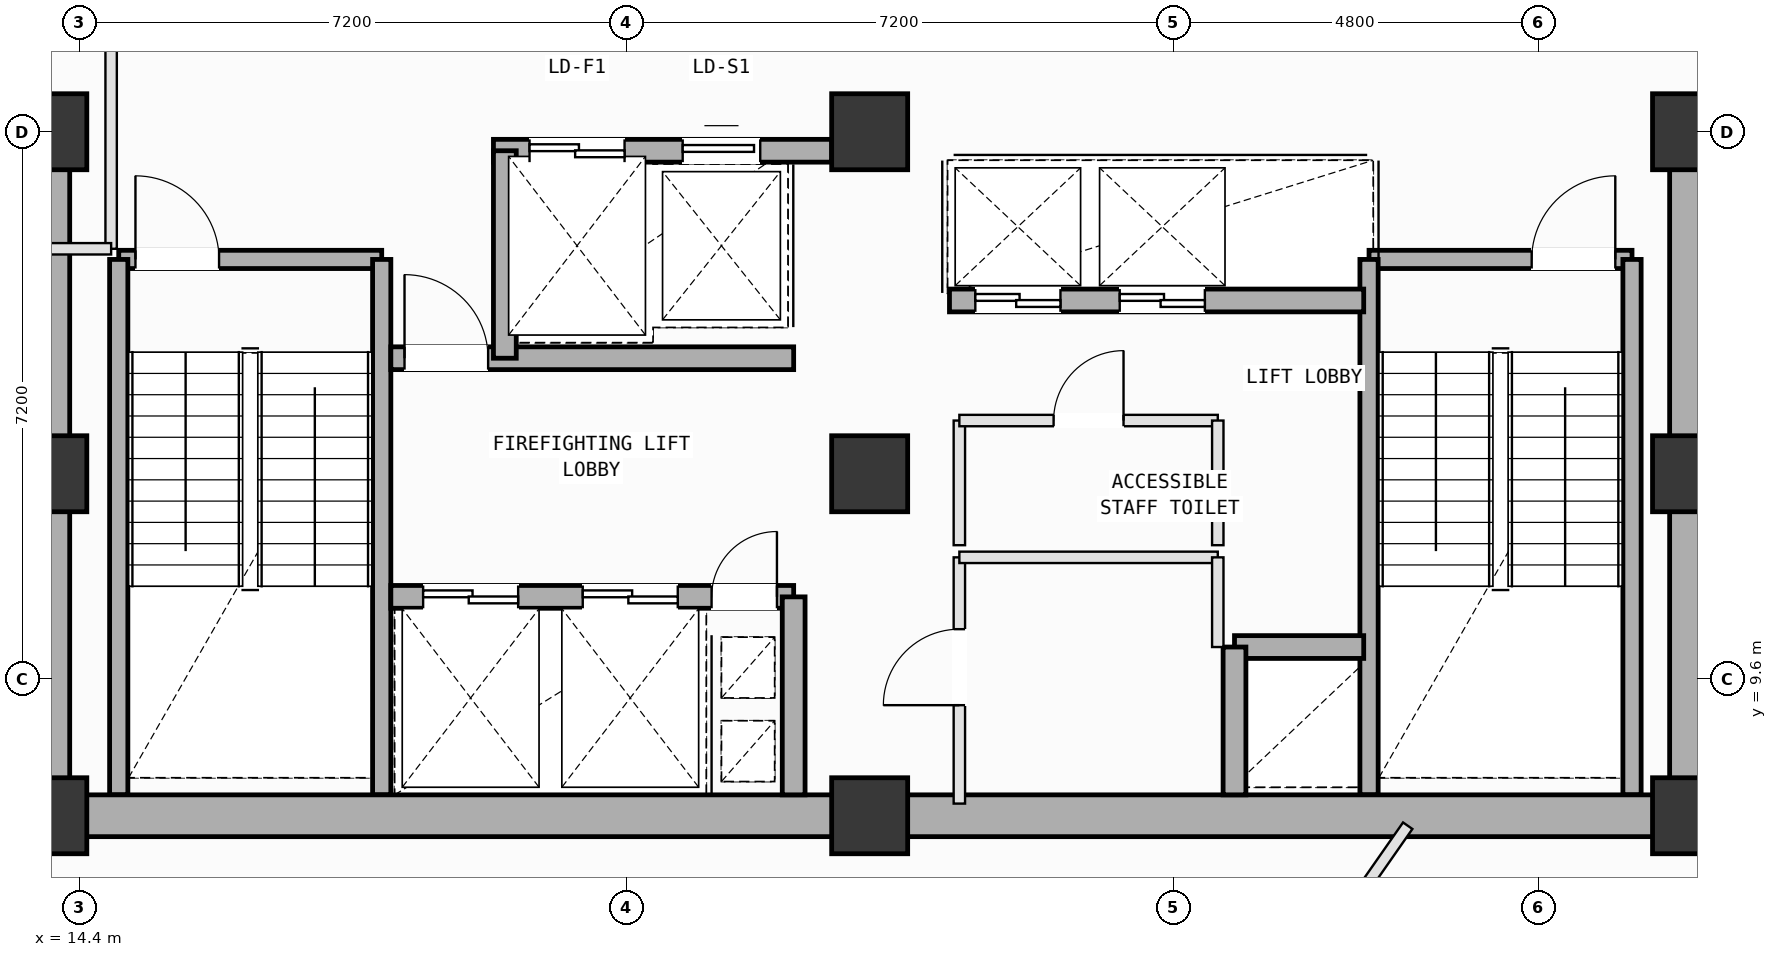
"""IFC4 building model, lengths in metres.
Left out: names, types, materials, properties, quantities, classifications, styles, units other than length and angle.
Written with IfcOpenShell. Run it as: python <this file> out.ifc"""

import sys

from ifc_helpers import new_model, si_unit, direction, frame, frame_2d, origin, origin_2d, place, context, subcontext, project, spatial, rectangle, extrude, element, fill, save


model = new_model("IFC4")
c1 = context("Model", 3, precision=1e-05, world=origin(), true_north=direction((0.0, 1.0)))
c2 = subcontext(c1, "Body", "Model", "MODEL_VIEW")
j1 = project(units=[si_unit("LENGTHUNIT", "METRE"), si_unit("PLANEANGLEUNIT", "RADIAN")], contexts=[c1])
p1 = place(None, origin())
s1 = spatial("IfcSite", under=j1, at=p1, CompositionType="ELEMENT")
p2 = place(p1, origin())
s2 = spatial("IfcBuilding", under=s1, at=p2, CompositionType="ELEMENT")
p3 = place(p2, frame((0.0, 0.0, 259.2)))
s3 = spatial("IfcBuildingStorey", under=s2, at=p3, CompositionType="ELEMENT", Elevation=259.2)
for number, where, z_axis, x_axis in (
    (1, (14.0, 7.8, 0.0), (0.0, 0.0, 1.0), (1.0, 0.0, 0.0)),
    (2, (14.0, 12.3, 0.0), (0.0, 0.0, 1.0), (1.0, 0.0, 0.0)),
    (3, (14.0, 16.8, 0.0), (0.0, 0.0, 1.0), (1.0, 0.0, 0.0)),
    (4, (24.8, 7.8, 0.0), (0.0, 0.0, 1.0), (1.0, 0.0, 0.0)),
    (5, (24.8, 12.3, 0.0), (0.0, 0.0, 1.0), (1.0, 0.0, 0.0)),
    (6, (24.8, 16.8, 0.0), (0.0, 0.0, 1.0), (1.0, 0.0, 0.0)),
    (7, (35.6, 7.8, 0.0), (0.0, 0.0, 1.0), (1.0, 0.0, 0.0)),
    (8, (35.6, 12.3, 0.0), (0.0, 0.0, 1.0), (1.0, 0.0, 0.0)),
    (9, (35.6, 16.8, 0.0), (0.0, 0.0, 1.0), (1.0, 0.0, 0.0)),
):
    element("IfcColumn", number, at=place(p3, frame(where, z_axis=z_axis, x_axis=x_axis)), inside=s3, PredefinedType="COLUMN", context=c2, shape_type="SweptSolid", body=[
        extrude(rectangle(XDim=1.0, YDim=1.0, at=origin_2d()), origin(), (0.0, 0.0, 1.0), 4.0),
    ])
p4 = place(p3, frame((14.92, 15.12, 0.0), z_axis=(0.0, 0.0, 1.0), x_axis=(1.0, 0.0, 0.0)))
e10 = element("IfcWall", 10, at=p4, inside=s3, PredefinedType="SOLIDWALL", context=c2, shape_type="SweptSolid", body=[
    extrude(rectangle(XDim=3.46, YDim=0.24, at=frame_2d((1.73, 0.0))), origin(), (0.0, 0.0, 1.0), 3.78),
])
p5 = place(p4, frame((0.22, 0.0, 0.0)))
e11 = element("IfcOpeningElement", 11, at=p5, cuts=e10, PredefinedType="OPENING", context=c2, shape_type="SweptSolid", body=[
    extrude(rectangle(XDim=1.1, YDim=2.15, at=frame_2d((0.55, 1.075))), frame((0.0, 0.13, 0.0), z_axis=(0.0, -1.0, 0.0), x_axis=(1.0, 0.0, 0.0)), (0.0, 0.0, 1.0), 0.26),
])
for number, where, z_axis, x_axis in (
    (12, (18.38, 15.12, 0.0), (0.0, 0.0, 1.0), (0.0, -1.0, 0.0)),
    (13, (14.92, 8.075, 0.0), (0.0, 0.0, 1.0), (0.0, 1.0, 0.0)),
):
    element("IfcWall", number, at=place(p3, frame(where, z_axis=z_axis, x_axis=x_axis)), inside=s3, PredefinedType="SOLIDWALL", context=c2, shape_type="SweptSolid", body=[
        extrude(rectangle(XDim=7.045, YDim=0.24, at=frame_2d((3.522, 0.0))), origin(), (0.0, 0.0, 1.0), 3.78),
    ])
p6 = place(p3, frame((31.37, 15.12, 0.0), z_axis=(0.0, 0.0, 1.0), x_axis=(1.0, 0.0, 0.0)))
e14 = element("IfcWall", 14, at=p6, inside=s3, PredefinedType="SOLIDWALL", context=c2, shape_type="SweptSolid", body=[
    extrude(rectangle(XDim=3.46, YDim=0.24, at=frame_2d((1.73, 0.0))), origin(), (0.0, 0.0, 1.0), 3.78),
])
p7 = place(p6, frame((2.14, 0.0, 0.0)))
e15 = element("IfcOpeningElement", 15, at=p7, cuts=e14, PredefinedType="OPENING", context=c2, shape_type="SweptSolid", body=[
    extrude(rectangle(XDim=1.1, YDim=2.15, at=frame_2d((0.55, 1.075))), frame((0.0, 0.13, 0.0), z_axis=(0.0, -1.0, 0.0), x_axis=(1.0, 0.0, 0.0)), (0.0, 0.0, 1.0), 0.26),
])
for number, where, z_axis, x_axis in (
    (16, (34.83, 15.12, 0.0), (0.0, 0.0, 1.0), (0.0, -1.0, 0.0)),
    (17, (31.37, 8.075, 0.0), (0.0, 0.0, 1.0), (0.0, 1.0, 0.0)),
):
    element("IfcWall", number, at=place(p3, frame(where, z_axis=z_axis, x_axis=x_axis)), inside=s3, PredefinedType="SOLIDWALL", context=c2, shape_type="SweptSolid", body=[
        extrude(rectangle(XDim=7.045, YDim=0.24, at=frame_2d((3.522, 0.0))), origin(), (0.0, 0.0, 1.0), 3.78),
    ])
for number, where, z_axis, x_axis in (
    (18, (14.0, 7.8, 0.0), (0.0, 0.0, 1.0), (1.0, 0.0, 0.0)),
    (19, (24.8, 7.8, 0.0), (0.0, 0.0, 1.0), (1.0, 0.0, 0.0)),
):
    element("IfcWall", number, at=place(p3, frame(where, z_axis=z_axis, x_axis=x_axis)), inside=s3, PredefinedType="SHEAR", context=c2, shape_type="SweptSolid", body=[
        extrude(rectangle(XDim=10.8, YDim=0.55, at=frame_2d((5.4, 0.0))), origin(), (0.0, 0.0, 1.0), 3.78),
    ])
for number, where, z_axis, x_axis in (
    (20, (35.6, 7.8, 0.0), (0.0, 0.0, 1.0), (0.0, 1.0, 0.0)),
    (21, (14.0, 16.8, 0.0), (0.0, 0.0, 1.0), (0.0, -1.0, 0.0)),
):
    element("IfcWall", number, at=place(p3, frame(where, z_axis=z_axis, x_axis=x_axis)), inside=s3, PredefinedType="SHEAR", context=c2, shape_type="SweptSolid", body=[
        extrude(rectangle(XDim=9.0, YDim=0.55, at=frame_2d((4.5, 0.0))), origin(), (0.0, 0.0, 1.0), 3.78),
    ])
p8 = place(p3, frame((19.85, 16.55, 0.0), z_axis=(0.0, 0.0, 1.0), x_axis=(1.0, 0.0, 0.0)))
e22 = element("IfcWall", 22, at=p8, inside=s3, PredefinedType="SOLIDWALL", context=c2, shape_type="SweptSolid", body=[
    extrude(rectangle(XDim=4.45, YDim=0.3, at=frame_2d((2.225, 0.0))), origin(), (0.0, 0.0, 1.0), 3.78),
])
p9 = place(p8, frame((0.475, 0.0, 0.0)))
e23 = element("IfcOpeningElement", 23, at=p9, cuts=e22, PredefinedType="OPENING", context=c2, shape_type="SweptSolid", body=[
    extrude(rectangle(XDim=1.25, YDim=2.18, at=frame_2d((0.625, 1.09))), frame((0.0, 0.16, 0.0), z_axis=(0.0, -1.0, 0.0), x_axis=(1.0, 0.0, 0.0)), (0.0, 0.0, 1.0), 0.32),
])
p10 = place(p8, frame((2.49, 0.0, 0.0)))
e24 = element("IfcOpeningElement", 24, at=p10, cuts=e22, PredefinedType="OPENING", context=c2, shape_type="SweptSolid", body=[
    extrude(rectangle(XDim=1.02, YDim=2.12, at=frame_2d((0.51, 1.06))), frame((0.0, 0.16, 0.0), z_axis=(0.0, -1.0, 0.0), x_axis=(1.0, 0.0, 0.0)), (0.0, 0.0, 1.0), 0.32),
])
p11 = place(p3, frame((18.5, 10.68, 0.0), z_axis=(0.0, 0.0, 1.0), x_axis=(1.0, 0.0, 0.0)))
e25 = element("IfcWall", 25, at=p11, inside=s3, PredefinedType="SOLIDWALL", context=c2, shape_type="SweptSolid", body=[
    extrude(rectangle(XDim=5.3, YDim=0.3, at=frame_2d((2.65, 0.0))), origin(), (0.0, 0.0, 1.0), 3.78),
])
p12 = place(p11, frame((4.22, 0.0, 0.0)))
e26 = element("IfcOpeningElement", 26, at=p12, cuts=e25, PredefinedType="OPENING", context=c2, shape_type="SweptSolid", body=[
    extrude(rectangle(XDim=0.86, YDim=2.06, at=frame_2d((0.43, 1.03))), frame((0.0, 0.16, 0.0), z_axis=(0.0, -1.0, 0.0), x_axis=(1.0, 0.0, 0.0)), (0.0, 0.0, 1.0), 0.32),
])
p13 = place(p11, frame((0.425, 0.0, 0.0)))
e27 = element("IfcOpeningElement", 27, at=p13, cuts=e25, PredefinedType="OPENING", context=c2, shape_type="SweptSolid", body=[
    extrude(rectangle(XDim=1.25, YDim=2.18, at=frame_2d((0.625, 1.09))), frame((0.0, 0.16, 0.0), z_axis=(0.0, -1.0, 0.0), x_axis=(1.0, 0.0, 0.0)), (0.0, 0.0, 1.0), 0.32),
])
p14 = place(p11, frame((2.525, 0.0, 0.0)))
e28 = element("IfcOpeningElement", 28, at=p14, cuts=e25, PredefinedType="OPENING", context=c2, shape_type="SweptSolid", body=[
    extrude(rectangle(XDim=1.25, YDim=2.18, at=frame_2d((0.625, 1.09))), frame((0.0, 0.16, 0.0), z_axis=(0.0, -1.0, 0.0), x_axis=(1.0, 0.0, 0.0)), (0.0, 0.0, 1.0), 0.32),
])
p15 = place(p3, frame((18.5, 13.82, 0.0), z_axis=(0.0, 0.0, 1.0), x_axis=(1.0, 0.0, 0.0)))
e29 = element("IfcWall", 29, at=p15, inside=s3, PredefinedType="SOLIDWALL", context=c2, shape_type="SweptSolid", body=[
    extrude(rectangle(XDim=5.3, YDim=0.3, at=frame_2d((2.65, 0.0))), origin(), (0.0, 0.0, 1.0), 3.78),
])
p16 = place(p15, frame((0.18, 0.0, 0.0)))
e30 = element("IfcOpeningElement", 30, at=p16, cuts=e29, PredefinedType="OPENING", context=c2, shape_type="SweptSolid", body=[
    extrude(rectangle(XDim=1.1, YDim=2.15, at=frame_2d((0.55, 1.075))), frame((0.0, 0.16, 0.0), z_axis=(0.0, -1.0, 0.0), x_axis=(1.0, 0.0, 0.0)), (0.0, 0.0, 1.0), 0.32),
])
p17 = place(p3, frame((23.8, 8.075, 0.0), z_axis=(0.0, 0.0, 1.0), x_axis=(0.0, 1.0, 0.0)))
e31 = element("IfcWall", 31, at=p17, inside=s3, PredefinedType="SOLIDWALL", context=c2, shape_type="SweptSolid", body=[
    extrude(rectangle(XDim=2.605, YDim=0.3, at=frame_2d((1.302, 0.0))), origin(), (0.0, 0.0, 1.0), 3.78),
])
p18 = place(p3, frame((20.0, 13.82, 0.0), z_axis=(0.0, 0.0, 1.0), x_axis=(0.0, 1.0, 0.0)))
e32 = element("IfcWall", 32, at=p18, inside=s3, PredefinedType="SOLIDWALL", context=c2, shape_type="SweptSolid", body=[
    extrude(rectangle(XDim=2.73, YDim=0.3, at=frame_2d((1.365, 0.0))), origin(), (0.0, 0.0, 1.0), 3.78),
])
p19 = place(p3, frame((29.6, 10.02, 0.0), z_axis=(0.0, 0.0, 1.0), x_axis=(1.0, 0.0, 0.0)))
e33 = element("IfcWall", 33, at=p19, inside=s3, PredefinedType="SOLIDWALL", context=c2, shape_type="SweptSolid", body=[
    extrude(rectangle(XDim=1.7, YDim=0.3, at=frame_2d((0.85, 0.0))), origin(), (0.0, 0.0, 1.0), 3.78),
])
p20 = place(p3, frame((29.6, 8.075, 0.0), z_axis=(0.0, 0.0, 1.0), x_axis=(0.0, 1.0, 0.0)))
e34 = element("IfcWall", 34, at=p20, inside=s3, PredefinedType="SOLIDWALL", context=c2, shape_type="SweptSolid", body=[
    extrude(rectangle(XDim=1.945, YDim=0.3, at=frame_2d((0.973, 0.0))), origin(), (0.0, 0.0, 1.0), 3.78),
])
p21 = place(p3, frame((25.85, 14.58, 0.0), z_axis=(0.0, 0.0, 1.0), x_axis=(1.0, 0.0, 0.0)))
e35 = element("IfcWall", 35, at=p21, inside=s3, PredefinedType="SOLIDWALL", context=c2, shape_type="SweptSolid", body=[
    extrude(rectangle(XDim=5.45, YDim=0.3, at=frame_2d((2.725, 0.0))), origin(), (0.0, 0.0, 1.0), 3.78),
])
p22 = place(p21, frame((0.34, 0.0, 0.0)))
e36 = element("IfcOpeningElement", 36, at=p22, cuts=e35, PredefinedType="OPENING", context=c2, shape_type="SweptSolid", body=[
    extrude(rectangle(XDim=1.12, YDim=2.15, at=frame_2d((0.56, 1.075))), frame((0.0, 0.16, 0.0), z_axis=(0.0, -1.0, 0.0), x_axis=(1.0, 0.0, 0.0)), (0.0, 0.0, 1.0), 0.32),
])
p23 = place(p21, frame((2.24, 0.0, 0.0)))
e37 = element("IfcOpeningElement", 37, at=p23, cuts=e35, PredefinedType="OPENING", context=c2, shape_type="SweptSolid", body=[
    extrude(rectangle(XDim=1.12, YDim=2.15, at=frame_2d((0.56, 1.075))), frame((0.0, 0.16, 0.0), z_axis=(0.0, -1.0, 0.0), x_axis=(1.0, 0.0, 0.0)), (0.0, 0.0, 1.0), 0.32),
])
p24 = place(p3, frame((25.98, 7.96, 0.0), z_axis=(0.0, 0.0, 1.0), x_axis=(0.0, 1.0, 0.0)))
e38 = element("IfcWall", 38, at=p24, inside=s3, PredefinedType="PARTITIONING", context=c2, shape_type="SweptSolid", body=[
    extrude(rectangle(XDim=3.24, YDim=0.15, at=frame_2d((1.62, 0.0))), origin(), (0.0, 0.0, 1.0), 3.78),
])
p25 = place(p24, frame((1.295, 0.0, 0.0)))
e39 = element("IfcOpeningElement", 39, at=p25, cuts=e38, PredefinedType="OPENING", context=c2, shape_type="SweptSolid", body=[
    extrude(rectangle(XDim=1.0, YDim=2.12, at=frame_2d((0.5, 1.06))), frame((0.0, 0.085, 0.0), z_axis=(0.0, -1.0, 0.0), x_axis=(1.0, 0.0, 0.0)), (0.0, 0.0, 1.0), 0.17),
])
p26 = place(p3, frame((25.98, 11.2, 0.0), z_axis=(0.0, 0.0, 1.0), x_axis=(1.0, 0.0, 0.0)))
e40 = element("IfcWall", 40, at=p26, inside=s3, PredefinedType="PARTITIONING", context=c2, shape_type="SweptSolid", body=[
    extrude(rectangle(XDim=3.4, YDim=0.15, at=frame_2d((1.7, 0.0))), origin(), (0.0, 0.0, 1.0), 3.78),
])
p27 = place(p3, frame((29.38, 11.2, 0.0), z_axis=(0.0, 0.0, 1.0), x_axis=(0.0, -1.0, 0.0)))
e41 = element("IfcWall", 41, at=p27, inside=s3, PredefinedType="PARTITIONING", context=c2, shape_type="SweptSolid", body=[
    extrude(rectangle(XDim=1.18, YDim=0.15, at=frame_2d((0.59, 0.0))), origin(), (0.0, 0.0, 1.0), 3.78),
])
p28 = place(p3, frame((25.98, 11.36, 0.0), z_axis=(0.0, 0.0, 1.0), x_axis=(0.0, 1.0, 0.0)))
e42 = element("IfcWall", 42, at=p28, inside=s3, PredefinedType="PARTITIONING", context=c2, shape_type="SweptSolid", body=[
    extrude(rectangle(XDim=1.64, YDim=0.15, at=frame_2d((0.82, 0.0))), origin(), (0.0, 0.0, 1.0), 3.78),
])
p29 = place(p3, frame((25.98, 13.0, 0.0), z_axis=(0.0, 0.0, 1.0), x_axis=(1.0, 0.0, 0.0)))
e43 = element("IfcWall", 43, at=p29, inside=s3, PredefinedType="PARTITIONING", context=c2, shape_type="SweptSolid", body=[
    extrude(rectangle(XDim=3.4, YDim=0.15, at=frame_2d((1.7, 0.0))), origin(), (0.0, 0.0, 1.0), 3.78),
])
p30 = place(p29, frame((1.24, 0.0, 0.0)))
e44 = element("IfcOpeningElement", 44, at=p30, cuts=e43, PredefinedType="OPENING", context=c2, shape_type="SweptSolid", body=[
    extrude(rectangle(XDim=0.92, YDim=2.1, at=frame_2d((0.46, 1.05))), frame((0.0, 0.085, 0.0), z_axis=(0.0, -1.0, 0.0), x_axis=(1.0, 0.0, 0.0)), (0.0, 0.0, 1.0), 0.17),
])
p31 = place(p3, frame((29.38, 13.0, 0.0), z_axis=(0.0, 0.0, 1.0), x_axis=(0.0, -1.0, 0.0)))
e45 = element("IfcWall", 45, at=p31, inside=s3, PredefinedType="PARTITIONING", context=c2, shape_type="SweptSolid", body=[
    extrude(rectangle(XDim=1.64, YDim=0.15, at=frame_2d((0.82, 0.0))), origin(), (0.0, 0.0, 1.0), 3.78),
])
p32 = place(p3, frame((35.6, 7.5, 0.0), z_axis=(0.0, 0.0, 1.0), x_axis=(1.0, 0.0, 0.0)))
e46 = element("IfcWall", 46, at=p32, inside=s3, PredefinedType="PARTITIONING", context=c2, shape_type="SweptSolid", body=[
    extrude(rectangle(XDim=0.55, YDim=0.15, at=frame_2d((0.275, 0.0))), origin(), (0.0, 0.0, 1.0), 3.165),
])
p33 = place(p3, frame((31.879, 7.669, 0.0), z_axis=(0.0, 0.0, 1.0), x_axis=(-0.572169487651, -0.820135401871, 0.0)))
e47 = element("IfcWall", 47, at=p33, inside=s3, PredefinedType="PARTITIONING", context=c2, shape_type="SweptSolid", body=[
    extrude(rectangle(XDim=12.3, YDim=0.15, at=frame_2d((6.15, 0.0))), origin(), (0.0, 0.0, 1.0), 3.78),
])
p34 = place(p3, frame((14.82, 18.2, 0.0), z_axis=(0.0, 0.0, 1.0), x_axis=(0.0, -1.0, 0.0)))
e48 = element("IfcWall", 48, at=p34, inside=s3, PredefinedType="PARTITIONING", context=c2, shape_type="SweptSolid", body=[
    extrude(rectangle(XDim=2.94, YDim=0.15, at=frame_2d((1.47, 0.0))), origin(), (0.0, 0.0, 1.0), 3.78),
])
p35 = place(p3, frame((14.82, 15.26, 0.0), z_axis=(0.0, 0.0, 1.0), x_axis=(-1.0, 0.0, 0.0)))
e49 = element("IfcWall", 49, at=p35, inside=s3, PredefinedType="PARTITIONING", context=c2, shape_type="SweptSolid", body=[
    extrude(rectangle(XDim=1.12, YDim=0.15, at=frame_2d((0.56, 0.0))), origin(), (0.0, 0.0, 1.0), 3.78),
])
p36 = place(p5, origin())
e50 = element("IfcDoor", 50, at=p36, inside=s3, OperationType="SINGLE_SWING_LEFT", PredefinedType="DOOR", context=c2, shape_type="SweptSolid", body=[
    extrude(rectangle(XDim=1.1, YDim=2.15, at=frame_2d((0.55, 1.075))), frame((0.0, 0.025, 0.0), z_axis=(0.0, -1.0, 0.0), x_axis=(1.0, 0.0, 0.0)), (0.0, 0.0, 1.0), 0.05),
])
fill(e11, e50)
p37 = place(p7, origin())
e51 = element("IfcDoor", 51, at=p37, inside=s3, OperationType="SINGLE_SWING_RIGHT", PredefinedType="DOOR", context=c2, shape_type="SweptSolid", body=[
    extrude(rectangle(XDim=1.1, YDim=2.15, at=frame_2d((0.55, 1.075))), frame((0.0, 0.025, 0.0), z_axis=(0.0, -1.0, 0.0), x_axis=(1.0, 0.0, 0.0)), (0.0, 0.0, 1.0), 0.05),
])
fill(e15, e51)
p38 = place(p12, origin())
e52 = element("IfcDoor", 52, at=p38, inside=s3, OperationType="SINGLE_SWING_RIGHT", PredefinedType="DOOR", context=c2, shape_type="SweptSolid", body=[
    extrude(rectangle(XDim=0.86, YDim=2.06, at=frame_2d((0.43, 1.03))), frame((0.0, 0.025, 0.0), z_axis=(0.0, -1.0, 0.0), x_axis=(1.0, 0.0, 0.0)), (0.0, 0.0, 1.0), 0.05),
])
fill(e26, e52)
p39 = place(p16, origin())
e53 = element("IfcDoor", 53, at=p39, inside=s3, OperationType="SINGLE_SWING_LEFT", PredefinedType="DOOR", context=c2, shape_type="SweptSolid", body=[
    extrude(rectangle(XDim=1.1, YDim=2.15, at=frame_2d((0.55, 1.075))), frame((0.0, 0.025, 0.0), z_axis=(0.0, -1.0, 0.0), x_axis=(1.0, 0.0, 0.0)), (0.0, 0.0, 1.0), 0.05),
])
fill(e30, e53)
p40 = place(p13, origin())
e54 = element("IfcDoor", 54, at=p40, inside=s3, OperationType="DOUBLE_DOOR_SLIDING", PredefinedType="DOOR", context=c2, shape_type="SweptSolid", body=[
    extrude(rectangle(XDim=1.25, YDim=2.18, at=frame_2d((0.625, 1.09))), frame((0.0, 0.025, 0.0), z_axis=(0.0, -1.0, 0.0), x_axis=(1.0, 0.0, 0.0)), (0.0, 0.0, 1.0), 0.05),
])
fill(e27, e54)
p41 = place(p14, origin())
e55 = element("IfcDoor", 55, at=p41, inside=s3, OperationType="DOUBLE_DOOR_SLIDING", PredefinedType="DOOR", context=c2, shape_type="SweptSolid", body=[
    extrude(rectangle(XDim=1.25, YDim=2.18, at=frame_2d((0.625, 1.09))), frame((0.0, 0.025, 0.0), z_axis=(0.0, -1.0, 0.0), x_axis=(1.0, 0.0, 0.0)), (0.0, 0.0, 1.0), 0.05),
])
fill(e28, e55)
p42 = place(p22, origin())
e56 = element("IfcDoor", 56, at=p42, inside=s3, OperationType="DOUBLE_DOOR_SLIDING", PredefinedType="DOOR", context=c2, shape_type="SweptSolid", body=[
    extrude(rectangle(XDim=1.12, YDim=2.15, at=frame_2d((0.56, 1.075))), frame((0.0, 0.025, 0.0), z_axis=(0.0, -1.0, 0.0), x_axis=(1.0, 0.0, 0.0)), (0.0, 0.0, 1.0), 0.05),
])
fill(e36, e56)
p43 = place(p23, origin())
e57 = element("IfcDoor", 57, at=p43, inside=s3, OperationType="DOUBLE_DOOR_SLIDING", PredefinedType="DOOR", context=c2, shape_type="SweptSolid", body=[
    extrude(rectangle(XDim=1.12, YDim=2.15, at=frame_2d((0.56, 1.075))), frame((0.0, 0.025, 0.0), z_axis=(0.0, -1.0, 0.0), x_axis=(1.0, 0.0, 0.0)), (0.0, 0.0, 1.0), 0.05),
])
fill(e37, e57)
p44 = place(p9, origin())
e58 = element("IfcDoor", 58, at=p44, inside=s3, OperationType="DOUBLE_DOOR_SLIDING", PredefinedType="DOOR", context=c2, shape_type="SweptSolid", body=[
    extrude(rectangle(XDim=1.25, YDim=2.18, at=frame_2d((0.625, 1.09))), frame((0.0, 0.025, 0.0), z_axis=(0.0, -1.0, 0.0), x_axis=(1.0, 0.0, 0.0)), (0.0, 0.0, 1.0), 0.05),
])
fill(e23, e58)
p45 = place(p10, origin())
e59 = element("IfcDoor", 59, at=p45, inside=s3, OperationType="SLIDING_TO_LEFT", PredefinedType="DOOR", context=c2, shape_type="SweptSolid", body=[
    extrude(rectangle(XDim=1.02, YDim=2.12, at=frame_2d((0.51, 1.06))), frame((0.0, 0.025, 0.0), z_axis=(0.0, -1.0, 0.0), x_axis=(1.0, 0.0, 0.0)), (0.0, 0.0, 1.0), 0.05),
])
fill(e24, e59)
p46 = place(p25, origin())
e60 = element("IfcDoor", 60, at=p46, inside=s3, OperationType="SINGLE_SWING_LEFT", PredefinedType="DOOR", context=c2, shape_type="SweptSolid", body=[
    extrude(rectangle(XDim=1.0, YDim=2.12, at=frame_2d((0.5, 1.06))), frame((0.0, 0.025, 0.0), z_axis=(0.0, -1.0, 0.0), x_axis=(1.0, 0.0, 0.0)), (0.0, 0.0, 1.0), 0.05),
])
fill(e39, e60)
p47 = place(p30, origin())
e61 = element("IfcDoor", 61, at=p47, inside=s3, OperationType="SINGLE_SWING_RIGHT", PredefinedType="DOOR", context=c2, shape_type="SweptSolid", body=[
    extrude(rectangle(XDim=0.92, YDim=2.1, at=frame_2d((0.46, 1.05))), frame((0.0, 0.025, 0.0), z_axis=(0.0, -1.0, 0.0), x_axis=(1.0, 0.0, 0.0)), (0.0, 0.0, 1.0), 0.05),
])
fill(e44, e61)
save(model, sys.argv[1])
